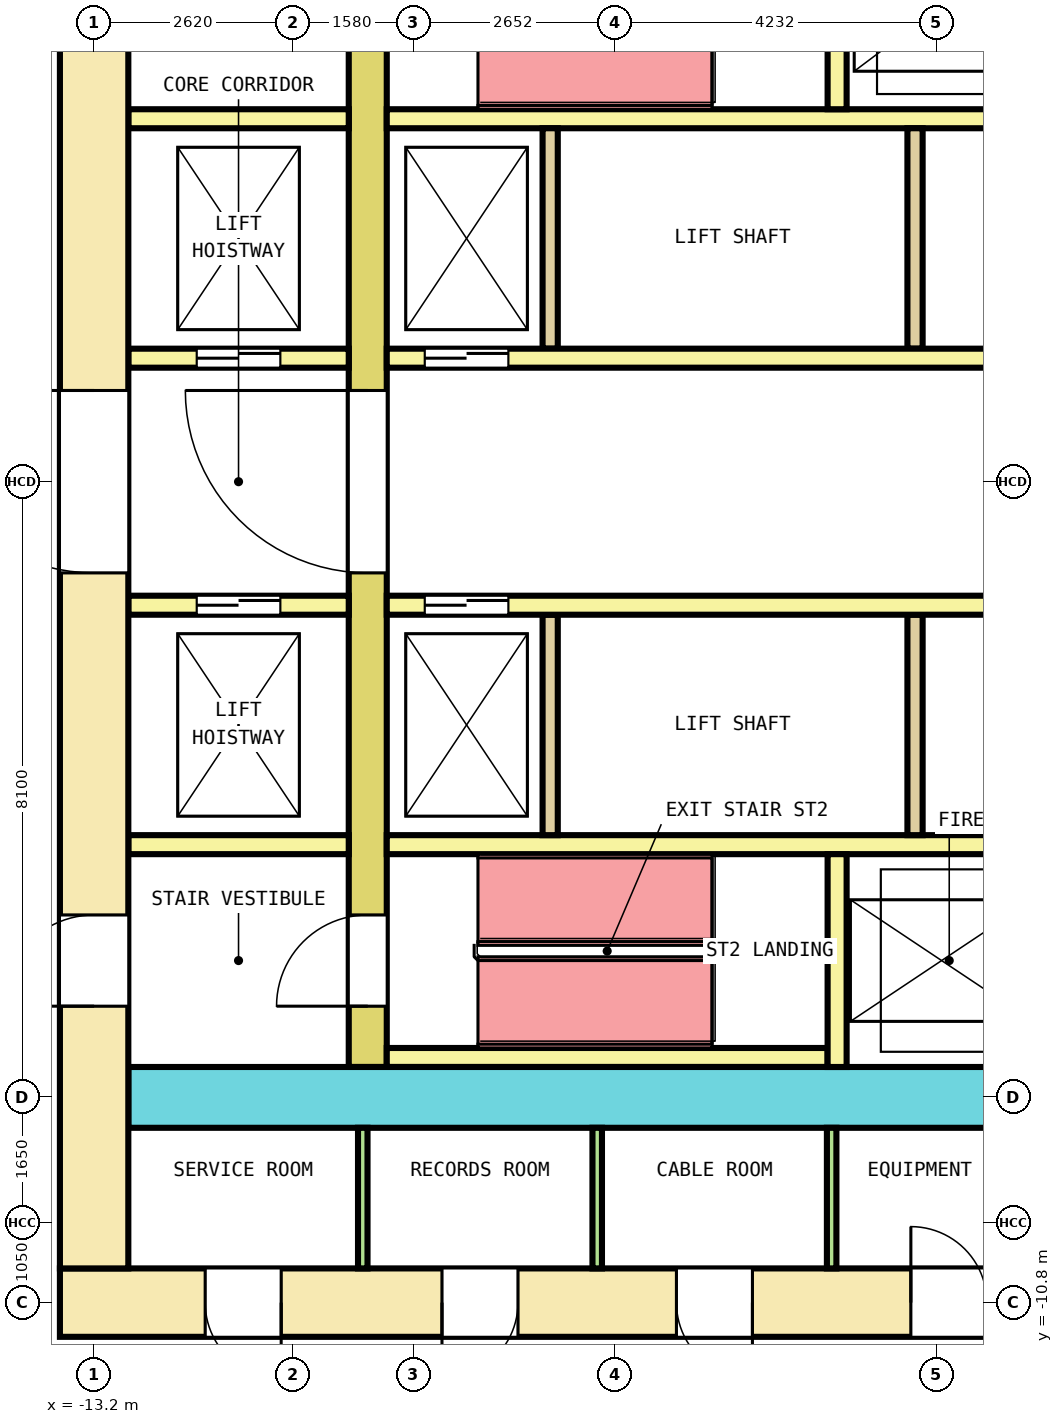
"""IFC4 building model, lengths in metres.
Left out: names, types, materials, properties, quantities, classifications, styles, units other than length and angle.
Written with IfcOpenShell. Run it as: python <this file> out.ifc"""

import sys

from ifc_helpers import new_model, si_unit, direction, frame, frame_2d, origin, place, context, subcontext, project, spatial, rectangle, extrude, element, fill, save


model = new_model("IFC4")
c1 = context("Model", 3, precision=1e-05, world=origin(), true_north=direction((0.0, 1.0)))
c2 = subcontext(c1, "Body", "Model", "MODEL_VIEW")
j1 = project(units=[si_unit("LENGTHUNIT", "METRE"), si_unit("PLANEANGLEUNIT", "RADIAN")], contexts=[c1])
p1 = place(None, origin())
s1 = spatial("IfcSite", under=j1, at=p1, CompositionType="ELEMENT")
p2 = place(p1, origin())
s2 = spatial("IfcBuilding", under=s1, at=p2, CompositionType="ELEMENT")
p3 = place(p2, frame((0.0, 0.0, 54.2)))
s3 = spatial("IfcBuildingStorey", under=s2, at=p3, CompositionType="ELEMENT", Elevation=54.2)
p4 = place(p3, frame((-13.65, -10.8, 0.0), z_axis=(0.0, 0.0, 1.0), x_axis=(1.0, 0.0, 0.0)))
e1 = element("IfcWall", 1, at=p4, inside=s3, PredefinedType="SHEAR", context=c2, shape_type="SweptSolid", body=[
    extrude(rectangle(XDim=27.3, YDim=0.9, at=frame_2d((13.65, 0.0))), origin(), (0.0, 0.0, 1.0), 4.1),
])
p5 = place(p4, frame((1.911, 0.0, 0.0)))
e2 = element("IfcOpeningElement", 2, at=p5, cuts=e1, PredefinedType="OPENING", context=c2, shape_type="SweptSolid", body=[
    extrude(rectangle(XDim=1.0, YDim=2.1, at=frame_2d((0.5, 1.05))), frame((0.0, 0.46, 0.0), z_axis=(0.0, -1.0, 0.0), x_axis=(1.0, 0.0, 0.0)), (0.0, 0.0, 1.0), 0.92),
])
p6 = place(p4, frame((5.027, 0.0, 0.0)))
e3 = element("IfcOpeningElement", 3, at=p6, cuts=e1, PredefinedType="OPENING", context=c2, shape_type="SweptSolid", body=[
    extrude(rectangle(XDim=1.0, YDim=2.1, at=frame_2d((0.5, 1.05))), frame((0.0, 0.46, 0.0), z_axis=(0.0, -1.0, 0.0), x_axis=(1.0, 0.0, 0.0)), (0.0, 0.0, 1.0), 0.92),
])
p7 = place(p4, frame((8.111, 0.0, 0.0)))
e4 = element("IfcOpeningElement", 4, at=p7, cuts=e1, PredefinedType="OPENING", context=c2, shape_type="SweptSolid", body=[
    extrude(rectangle(XDim=1.0, YDim=2.1, at=frame_2d((0.5, 1.05))), frame((0.0, 0.46, 0.0), z_axis=(0.0, -1.0, 0.0), x_axis=(1.0, 0.0, 0.0)), (0.0, 0.0, 1.0), 0.92),
])
p8 = place(p4, frame((11.195, 0.0, 0.0)))
e5 = element("IfcOpeningElement", 5, at=p8, cuts=e1, PredefinedType="OPENING", context=c2, shape_type="SweptSolid", body=[
    extrude(rectangle(XDim=1.0, YDim=2.1, at=frame_2d((0.5, 1.05))), frame((0.0, 0.46, 0.0), z_axis=(0.0, -1.0, 0.0), x_axis=(1.0, 0.0, 0.0)), (0.0, 0.0, 1.0), 0.92),
])
p9 = place(p4, frame((19.202, 0.0, 0.0)))
e6 = element("IfcOpeningElement", 6, at=p9, cuts=e1, PredefinedType="OPENING", context=c2, shape_type="SweptSolid", body=[
    extrude(rectangle(XDim=1.0, YDim=2.1, at=frame_2d((0.5, 1.05))), frame((0.0, 0.46, 0.0), z_axis=(0.0, -1.0, 0.0), x_axis=(1.0, 0.0, 0.0)), (0.0, 0.0, 1.0), 0.92),
])
p10 = place(p4, frame((21.881, 0.0, 0.0)))
e7 = element("IfcOpeningElement", 7, at=p10, cuts=e1, PredefinedType="OPENING", context=c2, shape_type="SweptSolid", body=[
    extrude(rectangle(XDim=1.0, YDim=2.1, at=frame_2d((0.5, 1.05))), frame((0.0, 0.46, 0.0), z_axis=(0.0, -1.0, 0.0), x_axis=(1.0, 0.0, 0.0)), (0.0, 0.0, 1.0), 0.92),
])
p11 = place(p4, frame((24.592, 0.0, 0.0)))
e8 = element("IfcOpeningElement", 8, at=p11, cuts=e1, PredefinedType="OPENING", context=c2, shape_type="SweptSolid", body=[
    extrude(rectangle(XDim=1.0, YDim=2.1, at=frame_2d((0.5, 1.05))), frame((0.0, 0.46, 0.0), z_axis=(0.0, -1.0, 0.0), x_axis=(1.0, 0.0, 0.0)), (0.0, 0.0, 1.0), 0.92),
])
p12 = place(p4, frame((15.2, 0.0, 0.0)))
e9 = element("IfcOpeningElement", 9, at=p12, cuts=e1, PredefinedType="OPENING", context=c2, shape_type="SweptSolid", body=[
    extrude(rectangle(XDim=1.2, YDim=2.1, at=frame_2d((0.6, 1.05))), frame((0.0, 0.46, 0.0), z_axis=(0.0, -1.0, 0.0), x_axis=(1.0, 0.0, 0.0)), (0.0, 0.0, 1.0), 0.92),
])
p13 = place(p3, frame((-13.2, -10.35, 0.0), z_axis=(0.0, 0.0, 1.0), x_axis=(0.0, 1.0, 0.0)))
e10 = element("IfcWall", 10, at=p13, inside=s3, PredefinedType="SHEAR", context=c2, shape_type="SweptSolid", body=[
    extrude(rectangle(XDim=20.7, YDim=0.9, at=frame_2d((10.35, 0.0))), origin(), (0.0, 0.0, 1.0), 4.1),
])
p14 = place(p13, frame((9.15, 0.0, 0.0)))
e11 = element("IfcOpeningElement", 11, at=p14, cuts=e10, PredefinedType="OPENING", context=c2, shape_type="SweptSolid", body=[
    extrude(rectangle(XDim=2.4, YDim=2.1, at=frame_2d((1.2, 1.05))), frame((0.0, 0.46, 0.0), z_axis=(0.0, -1.0, 0.0), x_axis=(1.0, 0.0, 0.0)), (0.0, 0.0, 1.0), 0.92),
])
p15 = place(p13, frame((16.05, 0.0, 0.0)))
e12 = element("IfcOpeningElement", 12, at=p15, cuts=e10, PredefinedType="OPENING", context=c2, shape_type="SweptSolid", body=[
    extrude(rectangle(XDim=1.2, YDim=2.1, at=frame_2d((0.6, 1.05))), frame((0.0, 0.46, 0.0), z_axis=(0.0, -1.0, 0.0), x_axis=(1.0, 0.0, 0.0)), (0.0, 0.0, 1.0), 0.92),
])
p16 = place(p13, frame((3.45, 0.0, 0.0)))
e13 = element("IfcOpeningElement", 13, at=p16, cuts=e10, PredefinedType="OPENING", context=c2, shape_type="SweptSolid", body=[
    extrude(rectangle(XDim=1.2, YDim=2.1, at=frame_2d((0.6, 1.05))), frame((0.0, 0.46, 0.0), z_axis=(0.0, -1.0, 0.0), x_axis=(1.0, 0.0, 0.0)), (0.0, 0.0, 1.0), 0.92),
])
p17 = place(p3, frame((-12.75, -8.1, 0.0), z_axis=(0.0, 0.0, 1.0), x_axis=(1.0, 0.0, 0.0)))
e14 = element("IfcWall", 14, at=p17, inside=s3, PredefinedType="SHEAR", context=c2, shape_type="SweptSolid", body=[
    extrude(rectangle(XDim=25.5, YDim=0.8, at=frame_2d((12.75, 0.0))), origin(), (0.0, 0.0, 1.0), 4.1),
])
p18 = place(p17, frame((14.3, 0.0, 0.0)))
e15 = element("IfcOpeningElement", 15, at=p18, cuts=e14, PredefinedType="OPENING", context=c2, shape_type="SweptSolid", body=[
    extrude(rectangle(XDim=1.2, YDim=2.1, at=frame_2d((0.6, 1.05))), frame((0.0, 0.41, 0.0), z_axis=(0.0, -1.0, 0.0), x_axis=(1.0, 0.0, 0.0)), (0.0, 0.0, 1.0), 0.82),
])
p19 = place(p3, frame((-9.6, -7.7, 0.0), z_axis=(0.0, 0.0, 1.0), x_axis=(0.0, 1.0, 0.0)))
e16 = element("IfcWall", 16, at=p19, inside=s3, PredefinedType="SHEAR", context=c2, shape_type="SweptSolid", body=[
    extrude(rectangle(XDim=15.4, YDim=0.5, at=frame_2d((7.7, 0.0))), origin(), (0.0, 0.0, 1.0), 4.1),
])
p20 = place(p19, frame((6.5, 0.0, 0.0)))
e17 = element("IfcOpeningElement", 17, at=p20, cuts=e16, PredefinedType="OPENING", context=c2, shape_type="SweptSolid", body=[
    extrude(rectangle(XDim=2.4, YDim=2.1, at=frame_2d((1.2, 1.05))), frame((0.0, 0.26, 0.0), z_axis=(0.0, -1.0, 0.0), x_axis=(1.0, 0.0, 0.0)), (0.0, 0.0, 1.0), 0.52),
])
p21 = place(p19, frame((13.4, 0.0, 0.0)))
e18 = element("IfcOpeningElement", 18, at=p21, cuts=e16, PredefinedType="OPENING", context=c2, shape_type="SweptSolid", body=[
    extrude(rectangle(XDim=1.2, YDim=2.1, at=frame_2d((0.6, 1.05))), frame((0.0, 0.26, 0.0), z_axis=(0.0, -1.0, 0.0), x_axis=(1.0, 0.0, 0.0)), (0.0, 0.0, 1.0), 0.52),
])
p22 = place(p19, frame((0.8, 0.0, 0.0)))
e19 = element("IfcOpeningElement", 19, at=p22, cuts=e16, PredefinedType="OPENING", context=c2, shape_type="SweptSolid", body=[
    extrude(rectangle(XDim=1.2, YDim=2.1, at=frame_2d((0.6, 1.05))), frame((0.0, 0.26, 0.0), z_axis=(0.0, -1.0, 0.0), x_axis=(1.0, 0.0, 0.0)), (0.0, 0.0, 1.0), 0.52),
])
p23 = place(p3, frame((-12.75, 1.625, 0.0), z_axis=(0.0, 0.0, 1.0), x_axis=(1.0, 0.0, 0.0)))
e20 = element("IfcWall", 20, at=p23, inside=s3, PredefinedType="SOLIDWALL", context=c2, shape_type="SweptSolid", body=[
    extrude(rectangle(XDim=2.9, YDim=0.25, at=frame_2d((1.45, 0.0))), origin(), (0.0, 0.0, 1.0), 4.1),
])
p24 = place(p23, frame((0.9, 0.0, 0.0)))
e21 = element("IfcOpeningElement", 21, at=p24, cuts=e20, PredefinedType="OPENING", context=c2, shape_type="SweptSolid", body=[
    extrude(rectangle(XDim=1.1, YDim=2.1, at=frame_2d((0.55, 1.05))), frame((0.0, 0.135, 0.0), z_axis=(0.0, -1.0, 0.0), x_axis=(1.0, 0.0, 0.0)), (0.0, 0.0, 1.0), 0.27),
])
p25 = place(p3, frame((-9.35, 1.625, 0.0), z_axis=(0.0, 0.0, 1.0), x_axis=(1.0, 0.0, 0.0)))
e22 = element("IfcWall", 22, at=p25, inside=s3, PredefinedType="SOLIDWALL", context=c2, shape_type="SweptSolid", body=[
    extrude(rectangle(XDim=18.7, YDim=0.25, at=frame_2d((9.35, 0.0))), origin(), (0.0, 0.0, 1.0), 4.1),
])
p26 = place(p25, frame((0.5, 0.0, 0.0)))
e23 = element("IfcOpeningElement", 23, at=p26, cuts=e22, PredefinedType="OPENING", context=c2, shape_type="SweptSolid", body=[
    extrude(rectangle(XDim=1.1, YDim=2.1, at=frame_2d((0.55, 1.05))), frame((0.0, 0.135, 0.0), z_axis=(0.0, -1.0, 0.0), x_axis=(1.0, 0.0, 0.0)), (0.0, 0.0, 1.0), 0.27),
])
p27 = place(p25, frame((17.1, 0.0, 0.0)))
e24 = element("IfcOpeningElement", 24, at=p27, cuts=e22, PredefinedType="OPENING", context=c2, shape_type="SweptSolid", body=[
    extrude(rectangle(XDim=1.1, YDim=2.1, at=frame_2d((0.55, 1.05))), frame((0.0, 0.135, 0.0), z_axis=(0.0, -1.0, 0.0), x_axis=(1.0, 0.0, 0.0)), (0.0, 0.0, 1.0), 0.27),
])
p28 = place(p3, frame((-12.75, 4.775, 0.0), z_axis=(0.0, 0.0, 1.0), x_axis=(1.0, 0.0, 0.0)))
e25 = element("IfcWall", 25, at=p28, inside=s3, PredefinedType="SOLIDWALL", context=c2, shape_type="SweptSolid", body=[
    extrude(rectangle(XDim=2.9, YDim=0.25, at=frame_2d((1.45, 0.0))), origin(), (0.0, 0.0, 1.0), 4.1),
])
p29 = place(p3, frame((-9.35, 4.775, 0.0), z_axis=(0.0, 0.0, 1.0), x_axis=(1.0, 0.0, 0.0)))
e26 = element("IfcWall", 26, at=p29, inside=s3, PredefinedType="SOLIDWALL", context=c2, shape_type="SweptSolid", body=[
    extrude(rectangle(XDim=18.7, YDim=0.25, at=frame_2d((9.35, 0.0))), origin(), (0.0, 0.0, 1.0), 4.1),
])
for number, where, z_axis, x_axis in (
    (27, (-7.2, 1.75, 0.0), (0.0, 0.0, 1.0), (0.0, 1.0, 0.0)),
    (28, (-2.4, 1.75, 0.0), (0.0, 0.0, 1.0), (0.0, 1.0, 0.0)),
):
    element("IfcWall", number, at=place(p3, frame(where, z_axis=z_axis, x_axis=x_axis)), inside=s3, PredefinedType="SOLIDWALL", context=c2, shape_type="SweptSolid", body=[
        extrude(rectangle(XDim=2.9, YDim=0.2, at=frame_2d((1.45, 0.0))), origin(), (0.0, 0.0, 1.0), 4.1),
    ])
p30 = place(p3, frame((-12.75, -1.625, 0.0), z_axis=(0.0, 0.0, 1.0), x_axis=(1.0, 0.0, 0.0)))
e29 = element("IfcWall", 29, at=p30, inside=s3, PredefinedType="SOLIDWALL", context=c2, shape_type="SweptSolid", body=[
    extrude(rectangle(XDim=2.9, YDim=0.25, at=frame_2d((1.45, 0.0))), origin(), (0.0, 0.0, 1.0), 4.1),
])
p31 = place(p30, frame((0.9, 0.0, 0.0)))
e30 = element("IfcOpeningElement", 30, at=p31, cuts=e29, PredefinedType="OPENING", context=c2, shape_type="SweptSolid", body=[
    extrude(rectangle(XDim=1.1, YDim=2.1, at=frame_2d((0.55, 1.05))), frame((0.0, 0.135, 0.0), z_axis=(0.0, -1.0, 0.0), x_axis=(1.0, 0.0, 0.0)), (0.0, 0.0, 1.0), 0.27),
])
p32 = place(p3, frame((-9.35, -1.625, 0.0), z_axis=(0.0, 0.0, 1.0), x_axis=(1.0, 0.0, 0.0)))
e31 = element("IfcWall", 31, at=p32, inside=s3, PredefinedType="SOLIDWALL", context=c2, shape_type="SweptSolid", body=[
    extrude(rectangle(XDim=18.7, YDim=0.25, at=frame_2d((9.35, 0.0))), origin(), (0.0, 0.0, 1.0), 4.1),
])
p33 = place(p32, frame((0.5, 0.0, 0.0)))
e32 = element("IfcOpeningElement", 32, at=p33, cuts=e31, PredefinedType="OPENING", context=c2, shape_type="SweptSolid", body=[
    extrude(rectangle(XDim=1.1, YDim=2.1, at=frame_2d((0.55, 1.05))), frame((0.0, 0.135, 0.0), z_axis=(0.0, -1.0, 0.0), x_axis=(1.0, 0.0, 0.0)), (0.0, 0.0, 1.0), 0.27),
])
p34 = place(p32, frame((17.1, 0.0, 0.0)))
e33 = element("IfcOpeningElement", 33, at=p34, cuts=e31, PredefinedType="OPENING", context=c2, shape_type="SweptSolid", body=[
    extrude(rectangle(XDim=1.1, YDim=2.1, at=frame_2d((0.55, 1.05))), frame((0.0, 0.135, 0.0), z_axis=(0.0, -1.0, 0.0), x_axis=(1.0, 0.0, 0.0)), (0.0, 0.0, 1.0), 0.27),
])
p35 = place(p3, frame((-12.75, -4.775, 0.0), z_axis=(0.0, 0.0, 1.0), x_axis=(1.0, 0.0, 0.0)))
e34 = element("IfcWall", 34, at=p35, inside=s3, PredefinedType="SOLIDWALL", context=c2, shape_type="SweptSolid", body=[
    extrude(rectangle(XDim=2.9, YDim=0.25, at=frame_2d((1.45, 0.0))), origin(), (0.0, 0.0, 1.0), 4.1),
])
p36 = place(p3, frame((-9.35, -4.775, 0.0), z_axis=(0.0, 0.0, 1.0), x_axis=(1.0, 0.0, 0.0)))
e35 = element("IfcWall", 35, at=p36, inside=s3, PredefinedType="SOLIDWALL", context=c2, shape_type="SweptSolid", body=[
    extrude(rectangle(XDim=18.7, YDim=0.25, at=frame_2d((9.35, 0.0))), origin(), (0.0, 0.0, 1.0), 4.1),
])
for number, where, z_axis, x_axis in (
    (36, (-7.2, -4.65, 0.0), (0.0, 0.0, 1.0), (0.0, 1.0, 0.0)),
    (37, (-2.4, -4.65, 0.0), (0.0, 0.0, 1.0), (0.0, 1.0, 0.0)),
):
    element("IfcWall", number, at=place(p3, frame(where, z_axis=z_axis, x_axis=x_axis)), inside=s3, PredefinedType="SOLIDWALL", context=c2, shape_type="SweptSolid", body=[
        extrude(rectangle(XDim=2.9, YDim=0.2, at=frame_2d((1.45, 0.0))), origin(), (0.0, 0.0, 1.0), 4.1),
    ])
p37 = place(p3, frame((-3.425, 4.9, 0.0), z_axis=(0.0, 0.0, 1.0), x_axis=(0.0, 1.0, 0.0)))
e38 = element("IfcWall", 38, at=p37, inside=s3, PredefinedType="SOLIDWALL", context=c2, shape_type="SweptSolid", body=[
    extrude(rectangle(XDim=2.8, YDim=0.25, at=frame_2d((1.4, 0.0))), origin(), (0.0, 0.0, 1.0), 4.1),
])
p38 = place(p3, frame((-9.35, -7.575, 0.0), z_axis=(0.0, 0.0, 1.0), x_axis=(1.0, 0.0, 0.0)))
e39 = element("IfcWall", 39, at=p38, inside=s3, PredefinedType="SOLIDWALL", context=c2, shape_type="SweptSolid", body=[
    extrude(rectangle(XDim=5.8, YDim=0.25, at=frame_2d((2.9, 0.0))), origin(), (0.0, 0.0, 1.0), 4.1),
])
p39 = place(p3, frame((-3.425, -7.7, 0.0), z_axis=(0.0, 0.0, 1.0), x_axis=(0.0, 1.0, 0.0)))
e40 = element("IfcWall", 40, at=p39, inside=s3, PredefinedType="SOLIDWALL", context=c2, shape_type="SweptSolid", body=[
    extrude(rectangle(XDim=2.8, YDim=0.25, at=frame_2d((1.4, 0.0))), origin(), (0.0, 0.0, 1.0), 4.1),
])
for number, where, z_axis, x_axis in (
    (41, (-9.666, -10.35, 0.0), (0.0, 0.0, 1.0), (0.0, 1.0, 0.0)),
    (42, (-6.581, -10.35, 0.0), (0.0, 0.0, 1.0), (0.0, 1.0, 0.0)),
    (43, (-3.497, -10.35, 0.0), (0.0, 0.0, 1.0), (0.0, 1.0, 0.0)),
):
    element("IfcWall", number, at=place(p3, frame(where, z_axis=z_axis, x_axis=x_axis)), inside=s3, PredefinedType="PARTITIONING", context=c2, shape_type="SweptSolid", body=[
        extrude(rectangle(XDim=1.85, YDim=0.125, at=frame_2d((0.925, 0.0))), origin(), (0.0, 0.0, 1.0), 4.1),
    ])
p40 = place(p24, origin())
e44 = element("IfcDoor", 44, at=p40, inside=s3, OperationType="DOUBLE_DOOR_SLIDING", PredefinedType="DOOR", context=c2, shape_type="SweptSolid", body=[
    extrude(rectangle(XDim=1.1, YDim=2.1, at=frame_2d((0.55, 1.05))), frame((0.0, 0.075, 0.0), z_axis=(0.0, -1.0, 0.0), x_axis=(1.0, 0.0, 0.0)), (0.0, 0.0, 1.0), 0.15),
])
fill(e21, e44)
p41 = place(p26, origin())
e45 = element("IfcDoor", 45, at=p41, inside=s3, OperationType="DOUBLE_DOOR_SLIDING", PredefinedType="DOOR", context=c2, shape_type="SweptSolid", body=[
    extrude(rectangle(XDim=1.1, YDim=2.1, at=frame_2d((0.55, 1.05))), frame((0.0, 0.075, 0.0), z_axis=(0.0, -1.0, 0.0), x_axis=(1.0, 0.0, 0.0)), (0.0, 0.0, 1.0), 0.15),
])
fill(e23, e45)
p42 = place(p31, origin())
e46 = element("IfcDoor", 46, at=p42, inside=s3, OperationType="DOUBLE_DOOR_SLIDING", PredefinedType="DOOR", context=c2, shape_type="SweptSolid", body=[
    extrude(rectangle(XDim=1.1, YDim=2.1, at=frame_2d((0.55, 1.05))), frame((0.0, 0.075, 0.0), z_axis=(0.0, -1.0, 0.0), x_axis=(1.0, 0.0, 0.0)), (0.0, 0.0, 1.0), 0.15),
])
fill(e30, e46)
p43 = place(p33, origin())
e47 = element("IfcDoor", 47, at=p43, inside=s3, OperationType="DOUBLE_DOOR_SLIDING", PredefinedType="DOOR", context=c2, shape_type="SweptSolid", body=[
    extrude(rectangle(XDim=1.1, YDim=2.1, at=frame_2d((0.55, 1.05))), frame((0.0, 0.075, 0.0), z_axis=(0.0, -1.0, 0.0), x_axis=(1.0, 0.0, 0.0)), (0.0, 0.0, 1.0), 0.15),
])
fill(e32, e47)
p44 = place(p20, origin())
e48 = element("IfcDoor", 48, at=p44, inside=s3, OperationType="DOUBLE_DOOR_SINGLE_SWING", PredefinedType="DOOR", context=c2, shape_type="SweptSolid", body=[
    extrude(rectangle(XDim=2.4, YDim=2.1, at=frame_2d((1.2, 1.05))), frame((0.0, 0.2, 0.0), z_axis=(0.0, -1.0, 0.0), x_axis=(1.0, 0.0, 0.0)), (0.0, 0.0, 1.0), 0.4),
])
fill(e17, e48)
p45 = place(p14, origin())
e49 = element("IfcDoor", 49, at=p45, inside=s3, OperationType="DOUBLE_DOOR_SINGLE_SWING", PredefinedType="DOOR", context=c2, shape_type="SweptSolid", body=[
    extrude(rectangle(XDim=2.4, YDim=2.1, at=frame_2d((1.2, 1.05))), frame((0.0, 0.3, 0.0), z_axis=(0.0, -1.0, 0.0), x_axis=(1.0, 0.0, 0.0)), (0.0, 0.0, 1.0), 0.6),
])
fill(e11, e49)
p46 = place(p22, origin())
e50 = element("IfcDoor", 50, at=p46, inside=s3, OperationType="SINGLE_SWING_LEFT", PredefinedType="DOOR", context=c2, shape_type="SweptSolid", body=[
    extrude(rectangle(XDim=1.2, YDim=2.1, at=frame_2d((0.6, 1.05))), frame((0.0, 0.2, 0.0), z_axis=(0.0, -1.0, 0.0), x_axis=(1.0, 0.0, 0.0)), (0.0, 0.0, 1.0), 0.4),
])
fill(e19, e50)
p47 = place(p16, origin())
e51 = element("IfcDoor", 51, at=p47, inside=s3, OperationType="SINGLE_SWING_RIGHT", PredefinedType="DOOR", context=c2, shape_type="SweptSolid", body=[
    extrude(rectangle(XDim=1.2, YDim=2.1, at=frame_2d((0.6, 1.05))), frame((0.0, 0.3, 0.0), z_axis=(0.0, -1.0, 0.0), x_axis=(1.0, 0.0, 0.0)), (0.0, 0.0, 1.0), 0.6),
])
fill(e13, e51)
p48 = place(p5, origin())
e52 = element("IfcDoor", 52, at=p48, inside=s3, OperationType="SINGLE_SWING_LEFT", PredefinedType="DOOR", context=c2, shape_type="SweptSolid", body=[
    extrude(rectangle(XDim=1.0, YDim=2.1, at=frame_2d((0.5, 1.05))), frame((0.0, 0.3, 0.0), z_axis=(0.0, -1.0, 0.0), x_axis=(1.0, 0.0, 0.0)), (0.0, 0.0, 1.0), 0.6),
])
fill(e2, e52)
p49 = place(p6, origin())
e53 = element("IfcDoor", 53, at=p49, inside=s3, OperationType="SINGLE_SWING_RIGHT", PredefinedType="DOOR", context=c2, shape_type="SweptSolid", body=[
    extrude(rectangle(XDim=1.0, YDim=2.1, at=frame_2d((0.5, 1.05))), frame((0.0, 0.3, 0.0), z_axis=(0.0, -1.0, 0.0), x_axis=(1.0, 0.0, 0.0)), (0.0, 0.0, 1.0), 0.6),
])
fill(e3, e53)
p50 = place(p7, origin())
e54 = element("IfcDoor", 54, at=p50, inside=s3, OperationType="SINGLE_SWING_LEFT", PredefinedType="DOOR", context=c2, shape_type="SweptSolid", body=[
    extrude(rectangle(XDim=1.0, YDim=2.1, at=frame_2d((0.5, 1.05))), frame((0.0, 0.3, 0.0), z_axis=(0.0, -1.0, 0.0), x_axis=(1.0, 0.0, 0.0)), (0.0, 0.0, 1.0), 0.6),
])
fill(e4, e54)
p51 = place(p8, origin())
e55 = element("IfcDoor", 55, at=p51, inside=s3, OperationType="SINGLE_SWING_RIGHT", PredefinedType="DOOR", context=c2, shape_type="SweptSolid", body=[
    extrude(rectangle(XDim=1.0, YDim=2.1, at=frame_2d((0.5, 1.05))), frame((0.0, 0.3, 0.0), z_axis=(0.0, -1.0, 0.0), x_axis=(1.0, 0.0, 0.0)), (0.0, 0.0, 1.0), 0.6),
])
fill(e5, e55)
save(model, sys.argv[1])
